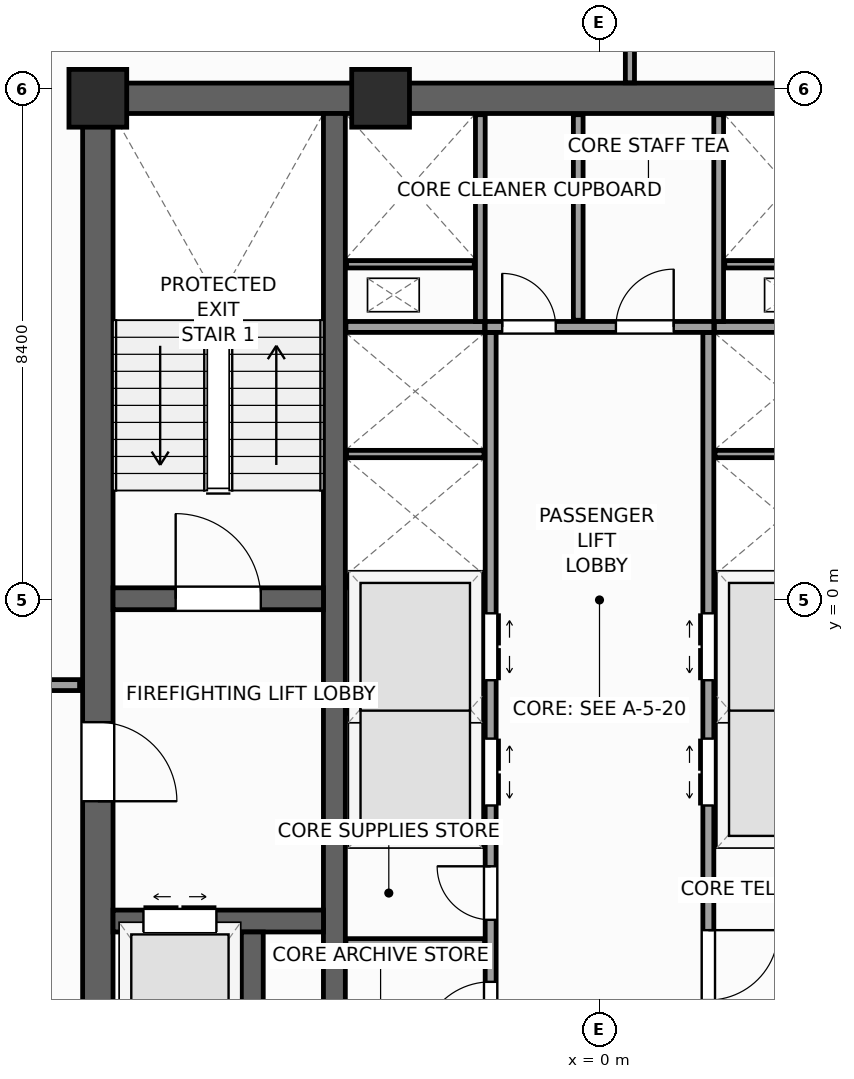
"""IFC4 building model, lengths in metres.
Left out: names, types, materials, properties, quantities, classifications, styles, units other than length and angle.
Written with IfcOpenShell. Run it as: python <this file> out.ifc"""

import sys

from ifc_helpers import new_model, si_unit, direction, frame, frame_2d, origin, origin_2d, place, context, subcontext, project, spatial, rectangle, extrude, source, transform, mapped, element, fill, save


model = new_model("IFC4")
c1 = context("Model", 3, precision=1e-05, world=origin(), true_north=direction((0.0, 1.0)))
c2 = subcontext(c1, "Body", "Model", "MODEL_VIEW")
j1 = project(units=[si_unit("LENGTHUNIT", "METRE"), si_unit("PLANEANGLEUNIT", "RADIAN")], contexts=[c1])
p1 = place(None, origin())
s1 = spatial("IfcSite", under=j1, at=p1, CompositionType="ELEMENT")
p2 = place(p1, origin())
s2 = spatial("IfcBuilding", under=s1, at=p2, CompositionType="ELEMENT")
p3 = place(p2, frame((0.0, 0.0, 209.5)))
s3 = spatial("IfcBuildingStorey", under=s2, at=p3, CompositionType="ELEMENT", Elevation=209.5)
p4 = place(p3, frame((-8.5, 8.25, 0.0), z_axis=(0.0, 0.0, 1.0), x_axis=(1.0, 0.0, 0.0)))
e1 = element("IfcWall", 1, at=p4, inside=s3, PredefinedType="SHEAR", context=c2, shape_type="SweptSolid", body=[
    extrude(rectangle(XDim=17.0, YDim=0.5, at=frame_2d((8.5, 0.0))), origin(), (0.0, 0.0, 1.0), 3.9),
])
p5 = place(p3, frame((-8.25, -8.0, 0.0), z_axis=(0.0, 0.0, 1.0), x_axis=(0.0, 1.0, 0.0)))
e2 = element("IfcWall", 2, at=p5, inside=s3, PredefinedType="SHEAR", context=c2, shape_type="SweptSolid", body=[
    extrude(rectangle(XDim=16.0, YDim=0.5, at=frame_2d((8.0, 0.0))), origin(), (0.0, 0.0, 1.0), 3.9),
])
p6 = place(p5, frame((4.69, 0.0, 0.0)))
e3 = element("IfcOpeningElement", 3, at=p6, cuts=e2, PredefinedType="OPENING", context=c2, shape_type="SweptSolid", body=[
    extrude(rectangle(XDim=1.3, YDim=2.2, at=frame_2d((0.65, 1.1))), frame((0.0, 0.26, 0.0), z_axis=(0.0, -1.0, 0.0), x_axis=(1.0, 0.0, 0.0)), (0.0, 0.0, 1.0), 0.52),
])
p7 = place(p3, frame((-4.36, -8.0, 0.0), z_axis=(0.0, 0.0, 1.0), x_axis=(0.0, 1.0, 0.0)))
e4 = element("IfcWall", 4, at=p7, inside=s3, PredefinedType="SHEAR", context=c2, shape_type="SweptSolid", body=[
    extrude(rectangle(XDim=16.0, YDim=0.36, at=frame_2d((8.0, 0.0))), origin(), (0.0, 0.0, 1.0), 3.9),
])
p8 = place(p3, frame((-8.0, 0.02, 0.0), z_axis=(0.0, 0.0, 1.0), x_axis=(1.0, 0.0, 0.0)))
e5 = element("IfcWall", 5, at=p8, inside=s3, PredefinedType="SHEAR", context=c2, shape_type="SweptSolid", body=[
    extrude(rectangle(XDim=3.46, YDim=0.36, at=frame_2d((1.73, 0.0))), origin(), (0.0, 0.0, 1.0), 3.9),
])
p9 = place(p8, frame((1.03, 0.0, 0.0)))
e6 = element("IfcOpeningElement", 6, at=p9, cuts=e5, PredefinedType="OPENING", context=c2, shape_type="SweptSolid", body=[
    extrude(rectangle(XDim=1.4, YDim=2.2, at=frame_2d((0.7, 1.1))), frame((0.0, 0.19, 0.0), z_axis=(0.0, -1.0, 0.0), x_axis=(1.0, 0.0, 0.0)), (0.0, 0.0, 1.0), 0.38),
])
p10 = place(p3, frame((-8.0, -5.28, 0.0), z_axis=(0.0, 0.0, 1.0), x_axis=(1.0, 0.0, 0.0)))
e7 = element("IfcWall", 7, at=p10, inside=s3, PredefinedType="SHEAR", context=c2, shape_type="SweptSolid", body=[
    extrude(rectangle(XDim=3.46, YDim=0.36, at=frame_2d((1.73, 0.0))), origin(), (0.0, 0.0, 1.0), 3.9),
])
p11 = place(p10, frame((0.5, 0.0, 0.0)))
e8 = element("IfcOpeningElement", 8, at=p11, cuts=e7, PredefinedType="OPENING", context=c2, shape_type="SweptSolid", body=[
    extrude(rectangle(XDim=1.2, YDim=2.25, at=frame_2d((0.6, 1.125))), frame((0.0, 0.19, 0.0), z_axis=(0.0, -1.0, 0.0), x_axis=(1.0, 0.0, 0.0)), (0.0, 0.0, 1.0), 0.38),
])
p12 = place(p3, frame((-5.71, -8.0, 0.0), z_axis=(0.0, 0.0, 1.0), x_axis=(0.0, 1.0, 0.0)))
e9 = element("IfcWall", 9, at=p12, inside=s3, PredefinedType="SHEAR", context=c2, shape_type="SweptSolid", body=[
    extrude(rectangle(XDim=2.54, YDim=0.36, at=frame_2d((1.27, 0.0))), origin(), (0.0, 0.0, 1.0), 3.9),
])
m1 = source(origin(), c2, "Body", "SweptSolid", [
    extrude(rectangle(XDim=0.95, YDim=0.95, at=origin_2d()), origin(), (0.0, 0.0, 1.0), 3.9),
])
for number, where, z_axis, x_axis in (
    (10, (-8.25, 8.25, 0.0), (0.0, 0.0, 1.0), (1.0, 0.0, 0.0)),
    (11, (-3.6, 8.25, 0.0), (0.0, 0.0, 1.0), (1.0, 0.0, 0.0)),
):
    element("IfcColumn", number, at=place(p3, frame(where, z_axis=z_axis, x_axis=x_axis)), inside=s3, PredefinedType="PILASTER", context=c2, shape_type="MappedRepresentation", body=[
        mapped(m1, transform((0.0, 0.0, 0.0), scale=1.0)),
    ])
p13 = place(p3, frame((29.154, 6.733, 0.0), z_axis=(0.0, 0.0, 1.0), x_axis=(-0.77714192302, 0.629325378072, 0.0)))
e12 = element("IfcWall", 12, at=p13, inside=s3, PredefinedType="STANDARD", context=c2, shape_type="SweptSolid", body=[
    extrude(rectangle(XDim=36.84, YDim=0.34, at=frame_2d((18.42, 0.0))), origin(), (0.0, 0.0, 1.0), 2.96),
])
p14 = place(p13, frame((3.721, 0.0, 0.48)))
e13 = element("IfcOpeningElement", 13, at=p14, cuts=e12, PredefinedType="OPENING", context=c2, shape_type="SweptSolid", body=[
    extrude(rectangle(XDim=1.4, YDim=2.4, at=frame_2d((0.7, 1.2))), frame((0.0, 0.18, 0.0), z_axis=(0.0, -1.0, 0.0), x_axis=(1.0, 0.0, 0.0)), (0.0, 0.0, 1.0), 0.36),
])
p15 = place(p13, frame((9.809, 0.0, 0.58)))
e14 = element("IfcOpeningElement", 14, at=p15, cuts=e12, PredefinedType="OPENING", context=c2, shape_type="SweptSolid", body=[
    extrude(rectangle(XDim=1.75, YDim=2.3, at=frame_2d((0.875, 1.15))), frame((0.0, 0.18, 0.0), z_axis=(0.0, -1.0, 0.0), x_axis=(1.0, 0.0, 0.0)), (0.0, 0.0, 1.0), 0.36),
])
p16 = place(p13, frame((16.058, 0.0, 0.58)))
e15 = element("IfcOpeningElement", 15, at=p16, cuts=e12, PredefinedType="OPENING", context=c2, shape_type="SweptSolid", body=[
    extrude(rectangle(XDim=1.75, YDim=2.3, at=frame_2d((0.875, 1.15))), frame((0.0, 0.18, 0.0), z_axis=(0.0, -1.0, 0.0), x_axis=(1.0, 0.0, 0.0)), (0.0, 0.0, 1.0), 0.36),
])
p17 = place(p13, frame((24.176, 0.0, 0.58)))
e16 = element("IfcOpeningElement", 16, at=p17, cuts=e12, PredefinedType="OPENING", context=c2, shape_type="SweptSolid", body=[
    extrude(rectangle(XDim=1.75, YDim=2.3, at=frame_2d((0.875, 1.15))), frame((0.0, 0.18, 0.0), z_axis=(0.0, -1.0, 0.0), x_axis=(1.0, 0.0, 0.0)), (0.0, 0.0, 1.0), 0.36),
])
p18 = place(p13, frame((30.982, 0.0, 0.48)))
e17 = element("IfcOpeningElement", 17, at=p18, cuts=e12, PredefinedType="OPENING", context=c2, shape_type="SweptSolid", body=[
    extrude(rectangle(XDim=1.4, YDim=2.4, at=frame_2d((0.7, 1.2))), frame((0.0, 0.18, 0.0), z_axis=(0.0, -1.0, 0.0), x_axis=(1.0, 0.0, 0.0)), (0.0, 0.0, 1.0), 0.36),
])
p19 = place(p3, frame((-6.733, 29.154, 0.0), z_axis=(0.0, 0.0, 1.0), x_axis=(-0.629325378072, -0.77714192302, 0.0)))
e18 = element("IfcWall", 18, at=p19, inside=s3, PredefinedType="STANDARD", context=c2, shape_type="SweptSolid", body=[
    extrude(rectangle(XDim=36.84, YDim=0.34, at=frame_2d((18.42, 0.0))), origin(), (0.0, 0.0, 1.0), 2.96),
])
p20 = place(p19, frame((23.495, 0.0, 0.0)))
e19 = element("IfcOpeningElement", 19, at=p20, cuts=e18, PredefinedType="OPENING", context=c2, shape_type="SweptSolid", body=[
    extrude(rectangle(XDim=1.05, YDim=2.25, at=frame_2d((0.525, 1.125))), frame((0.0, 0.18, 0.0), z_axis=(0.0, -1.0, 0.0), x_axis=(1.0, 0.0, 0.0)), (0.0, 0.0, 1.0), 0.36),
])
p21 = place(p19, frame((3.721, 0.0, 0.48)))
e20 = element("IfcOpeningElement", 20, at=p21, cuts=e18, PredefinedType="OPENING", context=c2, shape_type="SweptSolid", body=[
    extrude(rectangle(XDim=1.4, YDim=2.4, at=frame_2d((0.7, 1.2))), frame((0.0, 0.18, 0.0), z_axis=(0.0, -1.0, 0.0), x_axis=(1.0, 0.0, 0.0)), (0.0, 0.0, 1.0), 0.36),
])
p22 = place(p19, frame((9.809, 0.0, 0.58)))
e21 = element("IfcOpeningElement", 21, at=p22, cuts=e18, PredefinedType="OPENING", context=c2, shape_type="SweptSolid", body=[
    extrude(rectangle(XDim=1.75, YDim=2.3, at=frame_2d((0.875, 1.15))), frame((0.0, 0.18, 0.0), z_axis=(0.0, -1.0, 0.0), x_axis=(1.0, 0.0, 0.0)), (0.0, 0.0, 1.0), 0.36),
])
p23 = place(p19, frame((16.058, 0.0, 0.58)))
e22 = element("IfcOpeningElement", 22, at=p23, cuts=e18, PredefinedType="OPENING", context=c2, shape_type="SweptSolid", body=[
    extrude(rectangle(XDim=1.75, YDim=2.3, at=frame_2d((0.875, 1.15))), frame((0.0, 0.18, 0.0), z_axis=(0.0, -1.0, 0.0), x_axis=(1.0, 0.0, 0.0)), (0.0, 0.0, 1.0), 0.36),
])
p24 = place(p19, frame((25.676, 0.0, 0.58)))
e23 = element("IfcOpeningElement", 23, at=p24, cuts=e18, PredefinedType="OPENING", context=c2, shape_type="SweptSolid", body=[
    extrude(rectangle(XDim=1.75, YDim=2.3, at=frame_2d((0.875, 1.15))), frame((0.0, 0.18, 0.0), z_axis=(0.0, -1.0, 0.0), x_axis=(1.0, 0.0, 0.0)), (0.0, 0.0, 1.0), 0.36),
])
p25 = place(p19, frame((30.982, 0.0, 0.48)))
e24 = element("IfcOpeningElement", 24, at=p25, cuts=e18, PredefinedType="OPENING", context=c2, shape_type="SweptSolid", body=[
    extrude(rectangle(XDim=1.4, YDim=2.4, at=frame_2d((0.7, 1.2))), frame((0.0, 0.18, 0.0), z_axis=(0.0, -1.0, 0.0), x_axis=(1.0, 0.0, 0.0)), (0.0, 0.0, 1.0), 0.36),
])
p26 = place(p3, frame((-1.79, -7.98, 0.0), z_axis=(0.0, 0.0, 1.0), x_axis=(0.0, 1.0, 0.0)))
e25 = element("IfcWall", 25, at=p26, inside=s3, PredefinedType="PARTITIONING", context=c2, shape_type="SweptSolid", body=[
    extrude(rectangle(XDim=12.38, YDim=0.18, at=frame_2d((6.19, 0.0))), origin(), (0.0, 0.0, 1.0), 3.66),
])
p27 = place(p26, frame((4.6, 0.0, 0.0)))
e26 = element("IfcOpeningElement", 26, at=p27, cuts=e25, PredefinedType="OPENING", context=c2, shape_type="SweptSolid", body=[
    extrude(rectangle(XDim=1.1, YDim=2.2, at=frame_2d((0.55, 1.1))), frame((0.0, 0.1, 0.0), z_axis=(0.0, -1.0, 0.0), x_axis=(1.0, 0.0, 0.0)), (0.0, 0.0, 1.0), 0.2),
])
p28 = place(p26, frame((6.66, 0.0, 0.0)))
e27 = element("IfcOpeningElement", 27, at=p28, cuts=e25, PredefinedType="OPENING", context=c2, shape_type="SweptSolid", body=[
    extrude(rectangle(XDim=1.1, YDim=2.2, at=frame_2d((0.55, 1.1))), frame((0.0, 0.1, 0.0), z_axis=(0.0, -1.0, 0.0), x_axis=(1.0, 0.0, 0.0)), (0.0, 0.0, 1.0), 0.2),
])
p29 = place(p26, frame((0.55, 0.0, 0.0)))
e28 = element("IfcOpeningElement", 28, at=p29, cuts=e25, PredefinedType="OPENING", context=c2, shape_type="SweptSolid", body=[
    extrude(rectangle(XDim=1.15, YDim=2.25, at=frame_2d((0.575, 1.125))), frame((0.0, 0.1, 0.0), z_axis=(0.0, -1.0, 0.0), x_axis=(1.0, 0.0, 0.0)), (0.0, 0.0, 1.0), 0.2),
])
p30 = place(p26, frame((2.72, 0.0, 0.0)))
e29 = element("IfcOpeningElement", 29, at=p30, cuts=e25, PredefinedType="OPENING", context=c2, shape_type="SweptSolid", body=[
    extrude(rectangle(XDim=0.88, YDim=2.1, at=frame_2d((0.44, 1.05))), frame((0.0, 0.1, 0.0), z_axis=(0.0, -1.0, 0.0), x_axis=(1.0, 0.0, 0.0)), (0.0, 0.0, 1.0), 0.2),
])
p31 = place(p3, frame((1.79, -7.98, 0.0), z_axis=(0.0, 0.0, 1.0), x_axis=(0.0, 1.0, 0.0)))
e30 = element("IfcWall", 30, at=p31, inside=s3, PredefinedType="PARTITIONING", context=c2, shape_type="SweptSolid", body=[
    extrude(rectangle(XDim=12.38, YDim=0.18, at=frame_2d((6.19, 0.0))), origin(), (0.0, 0.0, 1.0), 3.66),
])
p32 = place(p31, frame((4.6, 0.0, 0.0)))
e31 = element("IfcOpeningElement", 31, at=p32, cuts=e30, PredefinedType="OPENING", context=c2, shape_type="SweptSolid", body=[
    extrude(rectangle(XDim=1.1, YDim=2.2, at=frame_2d((0.55, 1.1))), frame((0.0, 0.1, 0.0), z_axis=(0.0, -1.0, 0.0), x_axis=(1.0, 0.0, 0.0)), (0.0, 0.0, 1.0), 0.2),
])
p33 = place(p31, frame((6.66, 0.0, 0.0)))
e32 = element("IfcOpeningElement", 32, at=p33, cuts=e30, PredefinedType="OPENING", context=c2, shape_type="SweptSolid", body=[
    extrude(rectangle(XDim=1.1, YDim=2.2, at=frame_2d((0.55, 1.1))), frame((0.0, 0.1, 0.0), z_axis=(0.0, -1.0, 0.0), x_axis=(1.0, 0.0, 0.0)), (0.0, 0.0, 1.0), 0.2),
])
p34 = place(p31, frame((1.4, 0.0, 0.0)))
e33 = element("IfcOpeningElement", 33, at=p34, cuts=e30, PredefinedType="OPENING", context=c2, shape_type="SweptSolid", body=[
    extrude(rectangle(XDim=1.15, YDim=2.25, at=frame_2d((0.575, 1.125))), frame((0.0, 0.1, 0.0), z_axis=(0.0, -1.0, 0.0), x_axis=(1.0, 0.0, 0.0)), (0.0, 0.0, 1.0), 0.2),
])
p35 = place(p3, frame((-1.88, 4.49, 0.0), z_axis=(0.0, 0.0, 1.0), x_axis=(1.0, 0.0, 0.0)))
e34 = element("IfcWall", 34, at=p35, inside=s3, PredefinedType="PARTITIONING", context=c2, shape_type="SweptSolid", body=[
    extrude(rectangle(XDim=3.76, YDim=0.18, at=frame_2d((1.88, 0.0))), origin(), (0.0, 0.0, 1.0), 3.66),
])
p36 = place(p35, frame((0.28, 0.0, 0.0)))
e35 = element("IfcOpeningElement", 35, at=p36, cuts=e34, PredefinedType="OPENING", context=c2, shape_type="SweptSolid", body=[
    extrude(rectangle(XDim=0.88, YDim=2.1, at=frame_2d((0.44, 1.05))), frame((0.0, 0.1, 0.0), z_axis=(0.0, -1.0, 0.0), x_axis=(1.0, 0.0, 0.0)), (0.0, 0.0, 1.0), 0.2),
])
p37 = place(p35, frame((2.15, 0.0, 0.0)))
e36 = element("IfcOpeningElement", 36, at=p37, cuts=e34, PredefinedType="OPENING", context=c2, shape_type="SweptSolid", body=[
    extrude(rectangle(XDim=0.95, YDim=2.1, at=frame_2d((0.475, 1.05))), frame((0.0, 0.1, 0.0), z_axis=(0.0, -1.0, 0.0), x_axis=(1.0, 0.0, 0.0)), (0.0, 0.0, 1.0), 0.2),
])
for number, where, z_axis, x_axis in (
    (37, (-4.17, -3.9, 0.0), (0.0, 0.0, 1.0), (1.0, 0.0, 0.0)),
    (38, (1.89, -3.9, 0.0), (0.0, 0.0, 1.0), (1.0, 0.0, 0.0)),
    (39, (-4.17, 0.3, 0.0), (0.0, 0.0, 1.0), (1.0, 0.0, 0.0)),
    (40, (1.89, 0.3, 0.0), (0.0, 0.0, 1.0), (1.0, 0.0, 0.0)),
    (41, (-4.17, 4.49, 0.0), (0.0, 0.0, 1.0), (1.0, 0.0, 0.0)),
    (42, (1.89, 4.49, 0.0), (0.0, 0.0, 1.0), (1.0, 0.0, 0.0)),
):
    element("IfcWall", number, at=place(p3, frame(where, z_axis=z_axis, x_axis=x_axis)), inside=s3, PredefinedType="PARTITIONING", context=c2, shape_type="SweptSolid", body=[
        extrude(rectangle(XDim=2.28, YDim=0.18, at=frame_2d((1.14, 0.0))), origin(), (0.0, 0.0, 1.0), 3.66),
    ])
for number, where, z_axis, x_axis in (
    (43, (-4.16, -1.8, 0.0), (0.0, 0.0, 1.0), (1.0, 0.0, 0.0)),
    (44, (1.9, -1.8, 0.0), (0.0, 0.0, 1.0), (1.0, 0.0, 0.0)),
    (45, (-4.16, 2.4, 0.0), (0.0, 0.0, 1.0), (1.0, 0.0, 0.0)),
    (46, (1.9, 2.4, 0.0), (0.0, 0.0, 1.0), (1.0, 0.0, 0.0)),
):
    element("IfcWall", number, at=place(p3, frame(where, z_axis=z_axis, x_axis=x_axis)), inside=s3, PredefinedType="PARTITIONING", context=c2, shape_type="SweptSolid", body=[
        extrude(rectangle(XDim=2.26, YDim=0.12, at=frame_2d((1.13, 0.0))), origin(), (0.0, 0.0, 1.0), 3.66),
    ])
p38 = place(p3, frame((-4.17, -5.65, 0.0), z_axis=(0.0, 0.0, 1.0), x_axis=(1.0, 0.0, 0.0)))
e47 = element("IfcWall", 47, at=p38, inside=s3, PredefinedType="PARTITIONING", context=c2, shape_type="SweptSolid", body=[
    extrude(rectangle(XDim=2.28, YDim=0.16, at=frame_2d((1.14, 0.0))), origin(), (0.0, 0.0, 1.0), 3.66),
])
for number, where, z_axis, x_axis in (
    (48, (-1.96, 4.58, 0.0), (0.0, 0.0, 1.0), (0.0, 1.0, 0.0)),
    (49, (1.96, 4.58, 0.0), (0.0, 0.0, 1.0), (0.0, 1.0, 0.0)),
):
    element("IfcWall", number, at=place(p3, frame(where, z_axis=z_axis, x_axis=x_axis)), inside=s3, PredefinedType="PARTITIONING", context=c2, shape_type="SweptSolid", body=[
        extrude(rectangle(XDim=3.4, YDim=0.16, at=frame_2d((1.7, 0.0))), origin(), (0.0, 0.0, 1.0), 3.66),
    ])
for number, where, z_axis, x_axis in (
    (50, (-4.16, 5.52, 0.0), (0.0, 0.0, 1.0), (1.0, 0.0, 0.0)),
    (51, (2.06, 5.52, 0.0), (0.0, 0.0, 1.0), (1.0, 0.0, 0.0)),
):
    element("IfcWall", number, at=place(p3, frame(where, z_axis=z_axis, x_axis=x_axis)), inside=s3, PredefinedType="PARTITIONING", context=c2, shape_type="SweptSolid", body=[
        extrude(rectangle(XDim=2.1, YDim=0.12, at=frame_2d((1.05, 0.0))), origin(), (0.0, 0.0, 1.0), 3.66),
    ])
p39 = place(p3, frame((-0.35, 4.6, 0.0), z_axis=(0.0, 0.0, 1.0), x_axis=(0.0, 1.0, 0.0)))
e52 = element("IfcWall", 52, at=p39, inside=s3, PredefinedType="PARTITIONING", context=c2, shape_type="SweptSolid", body=[
    extrude(rectangle(XDim=3.38, YDim=0.16, at=frame_2d((1.69, 0.0))), origin(), (0.0, 0.0, 1.0), 3.66),
])
p40 = place(p3, frame((-11.45, -1.4, 0.0), z_axis=(0.0, 0.0, 1.0), x_axis=(1.0, 0.0, 0.0)))
e53 = element("IfcWall", 53, at=p40, inside=s3, PredefinedType="PARTITIONING", context=c2, shape_type="SweptSolid", body=[
    extrude(rectangle(XDim=2.9, YDim=0.18, at=frame_2d((1.45, 0.0))), origin(), (0.0, 0.0, 1.0), 3.66),
])
p41 = place(p40, frame((0.9, 0.0, 0.0)))
e54 = element("IfcOpeningElement", 54, at=p41, cuts=e53, PredefinedType="OPENING", context=c2, shape_type="SweptSolid", body=[
    extrude(rectangle(XDim=1.1, YDim=2.2, at=frame_2d((0.55, 1.1))), frame((0.0, 0.1, 0.0), z_axis=(0.0, -1.0, 0.0), x_axis=(1.0, 0.0, 0.0)), (0.0, 0.0, 1.0), 0.2),
])
p42 = place(p3, frame((0.5, 8.505, 0.0), z_axis=(0.0, 0.0, 1.0), x_axis=(0.0, 1.0, 0.0)))
e55 = element("IfcWall", 55, at=p42, inside=s3, PredefinedType="PARTITIONING", context=c2, shape_type="SweptSolid", body=[
    extrude(rectangle(XDim=20.675, YDim=0.15, at=frame_2d((10.337, 0.0))), origin(), (0.0, 0.0, 1.0), 3.66),
])
m2 = source(origin(), c2, "Body", "SweptSolid", [
    extrude(rectangle(XDim=1.4, YDim=2.2, at=frame_2d((0.7, 1.1))), frame((0.0, 0.025, 0.0), z_axis=(0.0, -1.0, 0.0), x_axis=(1.0, 0.0, 0.0)), (0.0, 0.0, 1.0), 0.05),
])
p43 = place(p9, origin())
e56 = element("IfcDoor", 56, at=p43, inside=s3, OperationType="SINGLE_SWING_LEFT", PredefinedType="DOOR", context=c2, shape_type="MappedRepresentation", body=[
    mapped(m2, transform((0.0, 0.0, 0.0), scale=1.0)),
])
fill(e6, e56)
m3 = source(origin(), c2, "Body", "SweptSolid", [
    extrude(rectangle(XDim=1.3, YDim=2.2, at=frame_2d((0.65, 1.1))), frame((0.0, 0.025, 0.0), z_axis=(0.0, -1.0, 0.0), x_axis=(1.0, 0.0, 0.0)), (0.0, 0.0, 1.0), 0.05),
])
p44 = place(p6, frame((1.3, 0.0, 0.0), z_axis=(0.0, 0.0, 1.0), x_axis=(-1.0, 0.0, 0.0)))
e57 = element("IfcDoor", 57, at=p44, inside=s3, OperationType="SINGLE_SWING_LEFT", PredefinedType="DOOR", context=c2, shape_type="MappedRepresentation", body=[
    mapped(m3, transform((0.0, 0.0, 0.0), scale=1.0)),
])
fill(e3, e57)
m4 = source(origin(), c2, "Body", "SweptSolid", [
    extrude(rectangle(XDim=1.2, YDim=2.25, at=frame_2d((0.6, 1.125))), frame((0.0, 0.025, 0.0), z_axis=(0.0, -1.0, 0.0), x_axis=(1.0, 0.0, 0.0)), (0.0, 0.0, 1.0), 0.05),
])
p45 = place(p11, origin())
e58 = element("IfcDoor", 58, at=p45, inside=s3, OperationType="DOUBLE_DOOR_SLIDING", PredefinedType="DOOR", context=c2, shape_type="MappedRepresentation", body=[
    mapped(m4, transform((0.0, 0.0, 0.0), scale=1.0)),
])
fill(e8, e58)
m5 = source(origin(), c2, "Body", "SweptSolid", [
    extrude(rectangle(XDim=1.1, YDim=2.2, at=frame_2d((0.55, 1.1))), frame((0.0, 0.025, 0.0), z_axis=(0.0, -1.0, 0.0), x_axis=(1.0, 0.0, 0.0)), (0.0, 0.0, 1.0), 0.05),
])
p46 = place(p27, frame((1.1, 0.0, 0.0), z_axis=(0.0, 0.0, 1.0), x_axis=(-1.0, 0.0, 0.0)))
e59 = element("IfcDoor", 59, at=p46, inside=s3, OperationType="DOUBLE_DOOR_SLIDING", PredefinedType="DOOR", context=c2, shape_type="MappedRepresentation", body=[
    mapped(m5, transform((0.0, 0.0, 0.0), scale=1.0)),
])
fill(e26, e59)
p47 = place(p28, frame((1.1, 0.0, 0.0), z_axis=(0.0, 0.0, 1.0), x_axis=(-1.0, 0.0, 0.0)))
e60 = element("IfcDoor", 60, at=p47, inside=s3, OperationType="DOUBLE_DOOR_SLIDING", PredefinedType="DOOR", context=c2, shape_type="MappedRepresentation", body=[
    mapped(m5, transform((0.0, 0.0, 0.0), scale=1.0)),
])
fill(e27, e60)
p48 = place(p32, origin())
e61 = element("IfcDoor", 61, at=p48, inside=s3, OperationType="DOUBLE_DOOR_SLIDING", PredefinedType="DOOR", context=c2, shape_type="MappedRepresentation", body=[
    mapped(m5, transform((0.0, 0.0, 0.0), scale=1.0)),
])
fill(e31, e61)
p49 = place(p33, origin())
e62 = element("IfcDoor", 62, at=p49, inside=s3, OperationType="DOUBLE_DOOR_SLIDING", PredefinedType="DOOR", context=c2, shape_type="MappedRepresentation", body=[
    mapped(m5, transform((0.0, 0.0, 0.0), scale=1.0)),
])
fill(e32, e62)
m6 = source(origin(), c2, "Body", "SweptSolid", [
    extrude(rectangle(XDim=1.15, YDim=2.25, at=frame_2d((0.575, 1.125))), frame((0.0, 0.025, 0.0), z_axis=(0.0, -1.0, 0.0), x_axis=(1.0, 0.0, 0.0)), (0.0, 0.0, 1.0), 0.05),
])
p50 = place(p29, origin())
e63 = element("IfcDoor", 63, at=p50, inside=s3, OperationType="SINGLE_SWING_LEFT", PredefinedType="DOOR", context=c2, shape_type="MappedRepresentation", body=[
    mapped(m6, transform((0.0, 0.0, 0.0), scale=1.0)),
])
fill(e28, e63)
m7 = source(origin(), c2, "Body", "SweptSolid", [
    extrude(rectangle(XDim=0.88, YDim=2.1, at=frame_2d((0.44, 1.05))), frame((0.0, 0.025, 0.0), z_axis=(0.0, -1.0, 0.0), x_axis=(1.0, 0.0, 0.0)), (0.0, 0.0, 1.0), 0.05),
])
p51 = place(p30, origin())
e64 = element("IfcDoor", 64, at=p51, inside=s3, OperationType="SINGLE_SWING_RIGHT", PredefinedType="DOOR", context=c2, shape_type="MappedRepresentation", body=[
    mapped(m7, transform((0.0, 0.0, 0.0), scale=1.0)),
])
fill(e29, e64)
p52 = place(p34, frame((1.15, 0.0, 0.0), z_axis=(0.0, 0.0, 1.0), x_axis=(-1.0, 0.0, 0.0)))
e65 = element("IfcDoor", 65, at=p52, inside=s3, OperationType="SINGLE_SWING_RIGHT", PredefinedType="DOOR", context=c2, shape_type="MappedRepresentation", body=[
    mapped(m6, transform((0.0, 0.0, 0.0), scale=1.0)),
])
fill(e33, e65)
p53 = place(p36, origin())
e66 = element("IfcDoor", 66, at=p53, inside=s3, OperationType="SINGLE_SWING_LEFT", PredefinedType="DOOR", context=c2, shape_type="MappedRepresentation", body=[
    mapped(m7, transform((0.0, 0.0, 0.0), scale=1.0)),
])
fill(e35, e66)
m8 = source(origin(), c2, "Body", "SweptSolid", [
    extrude(rectangle(XDim=0.95, YDim=2.1, at=frame_2d((0.475, 1.05))), frame((0.0, 0.025, 0.0), z_axis=(0.0, -1.0, 0.0), x_axis=(1.0, 0.0, 0.0)), (0.0, 0.0, 1.0), 0.05),
])
p54 = place(p37, origin())
e67 = element("IfcDoor", 67, at=p54, inside=s3, OperationType="SINGLE_SWING_RIGHT", PredefinedType="DOOR", context=c2, shape_type="MappedRepresentation", body=[
    mapped(m8, transform((0.0, 0.0, 0.0), scale=1.0)),
])
fill(e36, e67)
save(model, sys.argv[1])
